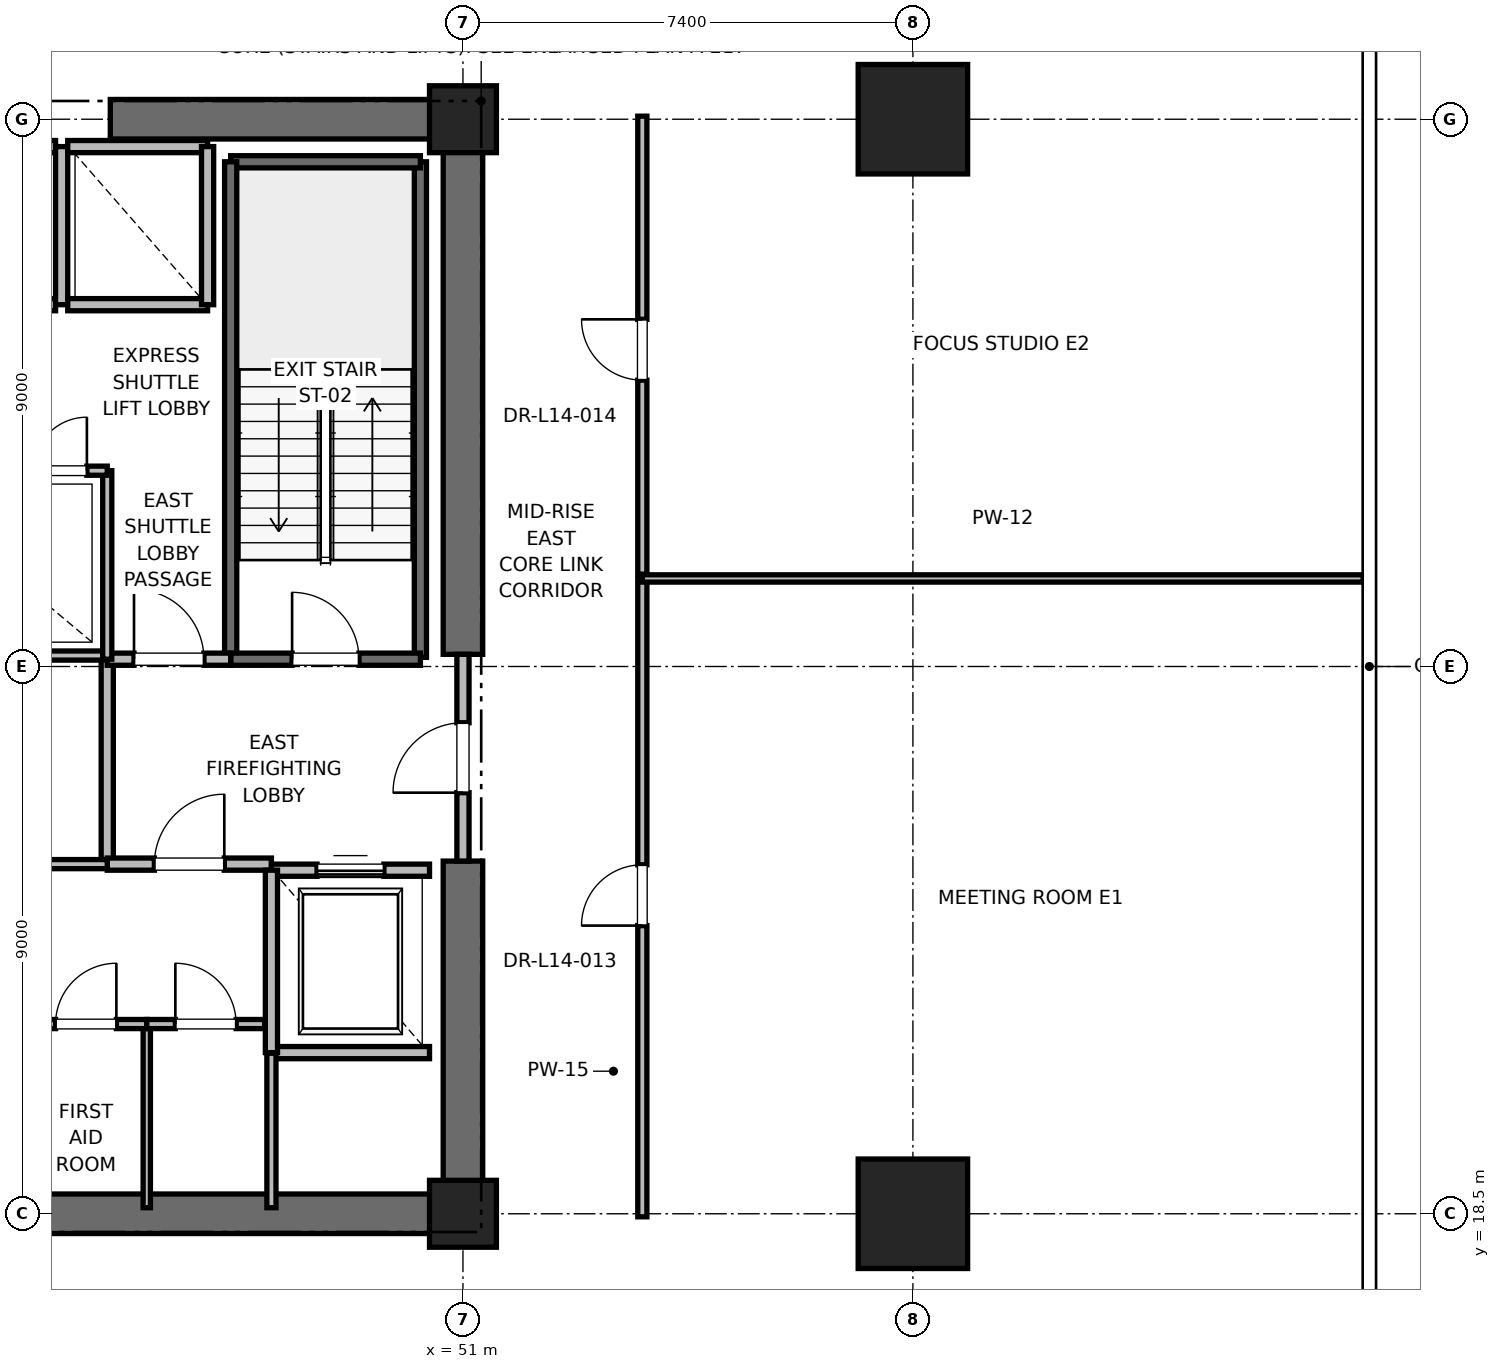
"""IFC4 building model, lengths in metres.
Left out: names, types, materials, properties, quantities, classifications, styles, units other than length and angle.
Written with IfcOpenShell. Run it as: python <this file> out.ifc"""

import sys

from ifc_helpers import new_model, si_unit, direction, frame, frame_2d, origin, origin_2d, place, context, subcontext, project, spatial, rectangle, extrude, element, fill, save


model = new_model("IFC4")
c1 = context("Model", 3, precision=1e-05, world=origin(), true_north=direction((0.0, 1.0)))
c2 = subcontext(c1, "Body", "Model", "MODEL_VIEW")
j1 = project(units=[si_unit("LENGTHUNIT", "METRE"), si_unit("PLANEANGLEUNIT", "RADIAN")], contexts=[c1])
p1 = place(None, origin())
s1 = spatial("IfcSite", under=j1, at=p1, CompositionType="ELEMENT")
p2 = place(p1, origin())
s2 = spatial("IfcBuilding", under=s1, at=p2, CompositionType="ELEMENT")
p3 = place(p2, frame((0.0, 0.0, 63.6)))
s3 = spatial("IfcBuildingStorey", under=s2, at=p3, CompositionType="ELEMENT", Elevation=63.6)
for number, where, z_axis, x_axis in (
    (1, (58.4, 18.5, 0.0), (0.0, 0.0, 1.0), (1.0, 0.0, 0.0)),
    (2, (58.4, 36.5, 0.0), (0.0, 0.0, 1.0), (1.0, 0.0, 0.0)),
):
    element("IfcColumn", number, at=place(p3, frame(where, z_axis=z_axis, x_axis=x_axis)), inside=s3, PredefinedType="COLUMN", context=c2, shape_type="SweptSolid", body=[
        extrude(rectangle(XDim=1.8, YDim=1.8, at=origin_2d()), origin(), (0.0, 0.0, 1.0), 4.0),
    ])
for number, where, z_axis, x_axis in (
    (3, (51.0, 18.5, 0.0), (0.0, 0.0, 1.0), (1.0, 0.0, 0.0)),
    (4, (51.0, 36.5, 0.0), (0.0, 0.0, 1.0), (1.0, 0.0, 0.0)),
):
    element("IfcColumn", number, at=place(p3, frame(where, z_axis=z_axis, x_axis=x_axis)), inside=s3, PredefinedType="PILASTER", context=c2, shape_type="SweptSolid", body=[
        extrude(rectangle(XDim=1.1, YDim=1.1, at=origin_2d()), origin(), (0.0, 0.0, 1.0), 4.0),
    ])
p4 = place(p3, frame((41.8, 18.5, 0.0), z_axis=(0.0, 0.0, 1.0), x_axis=(1.0, 0.0, 0.0)))
e5 = element("IfcWall", 5, at=p4, inside=s3, PredefinedType="SHEAR", context=c2, shape_type="SweptSolid", body=[
    extrude(rectangle(XDim=9.2, YDim=0.65, at=frame_2d((4.6, 0.0))), origin(), (0.0, 0.0, 1.0), 3.76),
])
for number, where, z_axis, x_axis in (
    (6, (45.2, 36.5, 0.0), (0.0, 0.0, 1.0), (1.0, 0.0, 0.0)),
    (7, (51.0, 18.5, 0.0), (0.0, 0.0, 1.0), (0.0, 1.0, 0.0)),
):
    element("IfcWall", number, at=place(p3, frame(where, z_axis=z_axis, x_axis=x_axis)), inside=s3, PredefinedType="SHEAR", context=c2, shape_type="SweptSolid", body=[
        extrude(rectangle(XDim=5.8, YDim=0.65, at=frame_2d((2.9, 0.0))), origin(), (0.0, 0.0, 1.0), 3.76),
    ])
p5 = place(p3, frame((51.0, 27.7, 0.0), z_axis=(0.0, 0.0, 1.0), x_axis=(0.0, 1.0, 0.0)))
e8 = element("IfcWall", 8, at=p5, inside=s3, PredefinedType="SHEAR", context=c2, shape_type="SweptSolid", body=[
    extrude(rectangle(XDim=8.8, YDim=0.65, at=frame_2d((4.4, 0.0))), origin(), (0.0, 0.0, 1.0), 3.76),
])
p6 = place(p3, frame((50.3, 27.65, 0.0), z_axis=(0.0, 0.0, 1.0), x_axis=(0.0, 1.0, 0.0)))
e9 = element("IfcWall", 9, at=p6, inside=s3, PredefinedType="SOLIDWALL", context=c2, shape_type="SweptSolid", body=[
    extrude(rectangle(XDim=8.15, YDim=0.2, at=frame_2d((4.075, 0.0))), origin(), (0.0, 0.0, 1.0), 3.76),
])
p7 = place(p3, frame((47.18, 35.8, 0.0), z_axis=(0.0, 0.0, 1.0), x_axis=(1.0, 0.0, 0.0)))
e10 = element("IfcWall", 10, at=p7, inside=s3, PredefinedType="SOLIDWALL", context=c2, shape_type="SweptSolid", body=[
    extrude(rectangle(XDim=3.12, YDim=0.2, at=frame_2d((1.56, 0.0))), origin(), (0.0, 0.0, 1.0), 3.76),
])
p8 = place(p3, frame((47.18, 27.62, 0.0), z_axis=(0.0, 0.0, 1.0), x_axis=(0.0, 1.0, 0.0)))
e11 = element("IfcWall", 11, at=p8, inside=s3, PredefinedType="SOLIDWALL", context=c2, shape_type="SweptSolid", body=[
    extrude(rectangle(XDim=8.18, YDim=0.2, at=frame_2d((4.09, 0.0))), origin(), (0.0, 0.0, 1.0), 3.76),
])
p9 = place(p3, frame((47.18, 27.62, 0.0), z_axis=(0.0, 0.0, 1.0), x_axis=(1.0, 0.0, 0.0)))
e12 = element("IfcWall", 12, at=p9, inside=s3, PredefinedType="SOLIDWALL", context=c2, shape_type="SweptSolid", body=[
    extrude(rectangle(XDim=3.12, YDim=0.2, at=frame_2d((1.56, 0.0))), origin(), (0.0, 0.0, 1.0), 3.76),
])
p10 = place(p9, frame((1.01, 0.0, 0.0)))
e13 = element("IfcOpeningElement", 13, at=p10, cuts=e12, PredefinedType="OPENING", context=c2, shape_type="SweptSolid", body=[
    extrude(rectangle(XDim=1.1, YDim=2.15, at=frame_2d((0.55, 1.075))), frame((0.0, 0.1, 0.0), z_axis=(0.0, -1.0, 0.0), x_axis=(1.0, 0.0, 0.0)), (0.0, 0.0, 1.0), 0.2),
])
p11 = place(p3, frame((45.15, 24.25, 0.0), z_axis=(0.0, 0.0, 1.0), x_axis=(0.0, 1.0, 0.0)))
e14 = element("IfcWall", 14, at=p11, inside=s3, PredefinedType="PARTITIONING", context=c2, shape_type="SweptSolid", body=[
    extrude(rectangle(XDim=3.37, YDim=0.2, at=frame_2d((1.685, 0.0))), origin(), (0.0, 0.0, 1.0), 3.76),
])
p12 = place(p3, frame((45.15, 24.25, 0.0), z_axis=(0.0, 0.0, 1.0), x_axis=(1.0, 0.0, 0.0)))
e15 = element("IfcWall", 15, at=p12, inside=s3, PredefinedType="PARTITIONING", context=c2, shape_type="SweptSolid", body=[
    extrude(rectangle(XDim=2.7, YDim=0.2, at=frame_2d((1.35, 0.0))), origin(), (0.0, 0.0, 1.0), 3.76),
])
p13 = place(p12, frame((0.775, 0.0, 0.0)))
e16 = element("IfcOpeningElement", 16, at=p13, cuts=e15, PredefinedType="OPENING", context=c2, shape_type="SweptSolid", body=[
    extrude(rectangle(XDim=1.15, YDim=2.2, at=frame_2d((0.575, 1.1))), frame((0.0, 0.1, 0.0), z_axis=(0.0, -1.0, 0.0), x_axis=(1.0, 0.0, 0.0)), (0.0, 0.0, 1.0), 0.2),
])
p14 = place(p3, frame((45.15, 27.62, 0.0), z_axis=(0.0, 0.0, 1.0), x_axis=(1.0, 0.0, 0.0)))
e17 = element("IfcWall", 17, at=p14, inside=s3, PredefinedType="PARTITIONING", context=c2, shape_type="SweptSolid", body=[
    extrude(rectangle(XDim=2.03, YDim=0.2, at=frame_2d((1.015, 0.0))), origin(), (0.0, 0.0, 1.0), 3.76),
])
p15 = place(p14, frame((0.44, 0.0, 0.0)))
e18 = element("IfcOpeningElement", 18, at=p15, cuts=e17, PredefinedType="OPENING", context=c2, shape_type="SweptSolid", body=[
    extrude(rectangle(XDim=1.15, YDim=2.2, at=frame_2d((0.575, 1.1))), frame((0.0, 0.1, 0.0), z_axis=(0.0, -1.0, 0.0), x_axis=(1.0, 0.0, 0.0)), (0.0, 0.0, 1.0), 0.2),
])
p16 = place(p3, frame((51.0, 24.3, 0.0), z_axis=(0.0, 0.0, 1.0), x_axis=(0.0, 1.0, 0.0)))
e19 = element("IfcWall", 19, at=p16, inside=s3, PredefinedType="PARTITIONING", context=c2, shape_type="SweptSolid", body=[
    extrude(rectangle(XDim=3.4, YDim=0.2, at=frame_2d((1.7, 0.0))), origin(), (0.0, 0.0, 1.0), 2.54),
])
p17 = place(p16, frame((1.125, 0.0, 0.0)))
e20 = element("IfcOpeningElement", 20, at=p17, cuts=e19, PredefinedType="OPENING", context=c2, shape_type="SweptSolid", body=[
    extrude(rectangle(XDim=1.15, YDim=2.2, at=frame_2d((0.575, 1.1))), frame((0.0, 0.1, 0.0), z_axis=(0.0, -1.0, 0.0), x_axis=(1.0, 0.0, 0.0)), (0.0, 0.0, 1.0), 0.2),
])
p18 = place(p3, frame((47.85, 21.15, 0.0), z_axis=(0.0, 0.0, 1.0), x_axis=(1.0, 0.0, 0.0)))
e21 = element("IfcWall", 21, at=p18, inside=s3, PredefinedType="SOLIDWALL", context=c2, shape_type="SweptSolid", body=[
    extrude(rectangle(XDim=2.6, YDim=0.2, at=frame_2d((1.3, 0.0))), origin(), (0.0, 0.0, 1.0), 3.76),
])
p19 = place(p3, frame((50.45, 24.15, 0.0), z_axis=(0.0, 0.0, 1.0), x_axis=(-1.0, 0.0, 0.0)))
e22 = element("IfcWall", 22, at=p19, inside=s3, PredefinedType="SOLIDWALL", context=c2, shape_type="SweptSolid", body=[
    extrude(rectangle(XDim=2.6, YDim=0.2, at=frame_2d((1.3, 0.0))), origin(), (0.0, 0.0, 1.0), 2.54),
])
p20 = place(p19, frame((0.75, 0.0, 0.0)))
e23 = element("IfcOpeningElement", 23, at=p20, cuts=e22, PredefinedType="OPENING", context=c2, shape_type="SweptSolid", body=[
    extrude(rectangle(XDim=1.1, YDim=2.2, at=frame_2d((0.55, 1.1))), frame((0.0, 0.1, 0.0), z_axis=(0.0, -1.0, 0.0), x_axis=(1.0, 0.0, 0.0)), (0.0, 0.0, 1.0), 0.2),
])
p21 = place(p3, frame((47.85, 24.15, 0.0), z_axis=(0.0, 0.0, 1.0), x_axis=(0.0, -1.0, 0.0)))
e24 = element("IfcWall", 24, at=p21, inside=s3, PredefinedType="SOLIDWALL", context=c2, shape_type="SweptSolid", body=[
    extrude(rectangle(XDim=3.0, YDim=0.2, at=frame_2d((1.5, 0.0))), origin(), (0.0, 0.0, 1.0), 3.76),
])
p22 = place(p3, frame((42.0, 33.45, 0.0), z_axis=(0.0, 0.0, 1.0), x_axis=(1.0, 0.0, 0.0)))
e25 = element("IfcWall", 25, at=p22, inside=s3, PredefinedType="SOLIDWALL", context=c2, shape_type="SweptSolid", body=[
    extrude(rectangle(XDim=2.3, YDim=0.2, at=frame_2d((1.15, 0.0))), origin(), (0.0, 0.0, 1.0), 3.76),
])
p23 = place(p3, frame((44.3, 36.05, 0.0), z_axis=(0.0, 0.0, 1.0), x_axis=(-1.0, 0.0, 0.0)))
e26 = element("IfcWall", 26, at=p23, inside=s3, PredefinedType="SOLIDWALL", context=c2, shape_type="SweptSolid", body=[
    extrude(rectangle(XDim=2.3, YDim=0.2, at=frame_2d((1.15, 0.0))), origin(), (0.0, 0.0, 1.0), 2.54),
])
p24 = place(p3, frame((44.4, 33.45, 0.0), z_axis=(0.0, 0.0, 1.0), x_axis=(0.0, 1.0, 0.0)))
e27 = element("IfcWall", 27, at=p24, inside=s3, PredefinedType="SOLIDWALL", context=c2, shape_type="SweptSolid", body=[
    extrude(rectangle(XDim=2.6, YDim=0.2, at=frame_2d((1.3, 0.0))), origin(), (0.0, 0.0, 1.0), 2.54),
])
p25 = place(p3, frame((44.5, 33.45, 0.0), z_axis=(0.0, 0.0, 1.0), x_axis=(1.0, 0.0, 0.0)))
e28 = element("IfcWall", 28, at=p25, inside=s3, PredefinedType="SOLIDWALL", context=c2, shape_type="SweptSolid", body=[
    extrude(rectangle(XDim=2.3, YDim=0.2, at=frame_2d((1.15, 0.0))), origin(), (0.0, 0.0, 1.0), 3.76),
])
p26 = place(p3, frame((46.8, 36.05, 0.0), z_axis=(0.0, 0.0, 1.0), x_axis=(-1.0, 0.0, 0.0)))
e29 = element("IfcWall", 29, at=p26, inside=s3, PredefinedType="SOLIDWALL", context=c2, shape_type="SweptSolid", body=[
    extrude(rectangle(XDim=2.3, YDim=0.2, at=frame_2d((1.15, 0.0))), origin(), (0.0, 0.0, 1.0), 2.54),
])
p27 = place(p3, frame((46.8, 33.45, 0.0), z_axis=(0.0, 0.0, 1.0), x_axis=(0.0, 1.0, 0.0)))
e30 = element("IfcWall", 30, at=p27, inside=s3, PredefinedType="SOLIDWALL", context=c2, shape_type="SweptSolid", body=[
    extrude(rectangle(XDim=2.6, YDim=0.2, at=frame_2d((1.3, 0.0))), origin(), (0.0, 0.0, 1.0), 3.76),
])
p28 = place(p3, frame((41.56, 27.68, 0.0), z_axis=(0.0, 0.0, 1.0), x_axis=(1.0, 0.0, 0.0)))
e31 = element("IfcWall", 31, at=p28, inside=s3, PredefinedType="PARTITIONING", context=c2, shape_type="SweptSolid", body=[
    extrude(rectangle(XDim=3.59, YDim=0.15, at=frame_2d((1.795, 0.0))), origin(), (0.0, 0.0, 1.0), 2.85),
])
p29 = place(p3, frame((47.85, 18.6, 0.0), z_axis=(0.0, 0.0, 1.0), x_axis=(0.0, 1.0, 0.0)))
e32 = element("IfcWall", 32, at=p29, inside=s3, PredefinedType="PARTITIONING", context=c2, shape_type="SweptSolid", body=[
    extrude(rectangle(XDim=2.54, YDim=0.15, at=frame_2d((1.27, 0.0))), origin(), (0.0, 0.0, 1.0), 2.85),
])
p30 = place(p3, frame((45.8, 18.6, 0.0), z_axis=(0.0, 0.0, 1.0), x_axis=(0.0, 1.0, 0.0)))
e33 = element("IfcWall", 33, at=p30, inside=s3, PredefinedType="PARTITIONING", context=c2, shape_type="SweptSolid", body=[
    extrude(rectangle(XDim=3.02, YDim=0.12, at=frame_2d((1.51, 0.0))), origin(), (0.0, 0.0, 1.0), 2.85),
])
p31 = place(p3, frame((43.8, 21.62, 0.0), z_axis=(0.0, 0.0, 1.0), x_axis=(1.0, 0.0, 0.0)))
e34 = element("IfcWall", 34, at=p31, inside=s3, PredefinedType="PARTITIONING", context=c2, shape_type="SweptSolid", body=[
    extrude(rectangle(XDim=2.0, YDim=0.15, at=frame_2d((1.0, 0.0))), origin(), (0.0, 0.0, 1.0), 2.85),
])
p32 = place(p31, frame((0.5, 0.0, 0.0)))
e35 = element("IfcOpeningElement", 35, at=p32, cuts=e34, PredefinedType="OPENING", context=c2, shape_type="SweptSolid", body=[
    extrude(rectangle(XDim=1.0, YDim=2.15, at=frame_2d((0.5, 1.075))), frame((0.0, 0.075, 0.0), z_axis=(0.0, -1.0, 0.0), x_axis=(1.0, 0.0, 0.0)), (0.0, 0.0, 1.0), 0.15),
])
p33 = place(p3, frame((45.8, 21.62, 0.0), z_axis=(0.0, 0.0, 1.0), x_axis=(1.0, 0.0, 0.0)))
e36 = element("IfcWall", 36, at=p33, inside=s3, PredefinedType="PARTITIONING", context=c2, shape_type="SweptSolid", body=[
    extrude(rectangle(XDim=1.94, YDim=0.15, at=frame_2d((0.97, 0.0))), origin(), (0.0, 0.0, 1.0), 2.85),
])
p34 = place(p33, frame((0.47, 0.0, 0.0)))
e37 = element("IfcOpeningElement", 37, at=p34, cuts=e36, PredefinedType="OPENING", context=c2, shape_type="SweptSolid", body=[
    extrude(rectangle(XDim=1.0, YDim=2.15, at=frame_2d((0.5, 1.075))), frame((0.0, 0.075, 0.0), z_axis=(0.0, -1.0, 0.0), x_axis=(1.0, 0.0, 0.0)), (0.0, 0.0, 1.0), 0.15),
])
p35 = place(p3, frame((41.76, 24.25, 0.0), z_axis=(0.0, 0.0, 1.0), x_axis=(1.0, 0.0, 0.0)))
e38 = element("IfcWall", 38, at=p35, inside=s3, PredefinedType="PARTITIONING", context=c2, shape_type="SweptSolid", body=[
    extrude(rectangle(XDim=3.39, YDim=0.15, at=frame_2d((1.695, 0.0))), origin(), (0.0, 0.0, 1.0), 2.85),
])
p36 = place(p35, frame((1.255, 0.0, 0.0)))
e39 = element("IfcOpeningElement", 39, at=p36, cuts=e38, PredefinedType="OPENING", context=c2, shape_type="SweptSolid", body=[
    extrude(rectangle(XDim=0.88, YDim=2.1, at=frame_2d((0.44, 1.05))), frame((0.0, 0.075, 0.0), z_axis=(0.0, -1.0, 0.0), x_axis=(1.0, 0.0, 0.0)), (0.0, 0.0, 1.0), 0.15),
])
p37 = place(p3, frame((45.15, 27.62, 0.0), z_axis=(0.0, 0.0, 1.0), x_axis=(0.0, 1.0, 0.0)))
e40 = element("IfcWall", 40, at=p37, inside=s3, PredefinedType="PARTITIONING", context=c2, shape_type="SweptSolid", body=[
    extrude(rectangle(XDim=3.1, YDim=0.15, at=frame_2d((1.55, 0.0))), origin(), (0.0, 0.0, 1.0), 2.85),
])
p38 = place(p3, frame((43.6, 30.72, 0.0), z_axis=(0.0, 0.0, 1.0), x_axis=(1.0, 0.0, 0.0)))
e41 = element("IfcWall", 41, at=p38, inside=s3, PredefinedType="PARTITIONING", context=c2, shape_type="SweptSolid", body=[
    extrude(rectangle(XDim=1.55, YDim=0.15, at=frame_2d((0.775, 0.0))), origin(), (0.0, 0.0, 1.0), 2.85),
])
p39 = place(p38, frame((0.335, 0.0, 0.0)))
e42 = element("IfcOpeningElement", 42, at=p39, cuts=e41, PredefinedType="OPENING", context=c2, shape_type="SweptSolid", body=[
    extrude(rectangle(XDim=0.88, YDim=2.1, at=frame_2d((0.44, 1.05))), frame((0.0, 0.075, 0.0), z_axis=(0.0, -1.0, 0.0), x_axis=(1.0, 0.0, 0.0)), (0.0, 0.0, 1.0), 0.15),
])
p40 = place(p3, frame((53.95, 18.45, 0.0), z_axis=(0.0, 0.0, 1.0), x_axis=(0.0, 1.0, 0.0)))
e43 = element("IfcWall", 43, at=p40, inside=s3, PredefinedType="PARTITIONING", context=c2, shape_type="SweptSolid", body=[
    extrude(rectangle(XDim=10.498, YDim=0.15, at=frame_2d((5.249, 0.0))), origin(), (0.0, 0.0, 1.0), 2.85),
])
p41 = place(p40, frame((4.789, 0.0, 0.0)))
e44 = element("IfcOpeningElement", 44, at=p41, cuts=e43, PredefinedType="OPENING", context=c2, shape_type="SweptSolid", body=[
    extrude(rectangle(XDim=1.0, YDim=2.15, at=frame_2d((0.5, 1.075))), frame((0.0, 0.075, 0.0), z_axis=(0.0, -1.0, 0.0), x_axis=(1.0, 0.0, 0.0)), (0.0, 0.0, 1.0), 0.15),
])
p42 = place(p3, frame((53.95, 28.948, 0.0), z_axis=(0.0, 0.0, 1.0), x_axis=(1.0, 0.0, 0.0)))
e45 = element("IfcWall", 45, at=p42, inside=s3, PredefinedType="PARTITIONING", context=c2, shape_type="SweptSolid", body=[
    extrude(rectangle(XDim=11.857, YDim=0.12, at=frame_2d((5.929, 0.0))), origin(), (0.0, 0.0, 1.0), 2.85),
])
p43 = place(p3, frame((53.95, 29.018, 0.0), z_axis=(0.0, 0.0, 1.0), x_axis=(0.0, 1.0, 0.0)))
e46 = element("IfcWall", 46, at=p43, inside=s3, PredefinedType="PARTITIONING", context=c2, shape_type="SweptSolid", body=[
    extrude(rectangle(XDim=7.532, YDim=0.15, at=frame_2d((3.766, 0.0))), origin(), (0.0, 0.0, 1.0), 2.85),
])
p44 = place(p43, frame((3.191, 0.0, 0.0)))
e47 = element("IfcOpeningElement", 47, at=p44, cuts=e46, PredefinedType="OPENING", context=c2, shape_type="SweptSolid", body=[
    extrude(rectangle(XDim=1.0, YDim=2.15, at=frame_2d((0.5, 1.075))), frame((0.0, 0.075, 0.0), z_axis=(0.0, -1.0, 0.0), x_axis=(1.0, 0.0, 0.0)), (0.0, 0.0, 1.0), 0.15),
])
p45 = place(p10, origin())
e48 = element("IfcDoor", 48, at=p45, inside=s3, OperationType="SINGLE_SWING_LEFT", PredefinedType="DOOR", context=c2, shape_type="SweptSolid", body=[
    extrude(rectangle(XDim=1.1, YDim=2.15, at=frame_2d((0.55, 1.075))), frame((0.0, 0.025, 0.0), z_axis=(0.0, -1.0, 0.0), x_axis=(1.0, 0.0, 0.0)), (0.0, 0.0, 1.0), 0.05),
])
fill(e13, e48)
p46 = place(p13, origin())
e49 = element("IfcDoor", 49, at=p46, inside=s3, OperationType="SINGLE_SWING_RIGHT", PredefinedType="DOOR", context=c2, shape_type="SweptSolid", body=[
    extrude(rectangle(XDim=1.15, YDim=2.2, at=frame_2d((0.575, 1.1))), frame((0.0, 0.025, 0.0), z_axis=(0.0, -1.0, 0.0), x_axis=(1.0, 0.0, 0.0)), (0.0, 0.0, 1.0), 0.05),
])
fill(e16, e49)
p47 = place(p15, origin())
e50 = element("IfcDoor", 50, at=p47, inside=s3, OperationType="SINGLE_SWING_LEFT", PredefinedType="DOOR", context=c2, shape_type="SweptSolid", body=[
    extrude(rectangle(XDim=1.15, YDim=2.2, at=frame_2d((0.575, 1.1))), frame((0.0, 0.025, 0.0), z_axis=(0.0, -1.0, 0.0), x_axis=(1.0, 0.0, 0.0)), (0.0, 0.0, 1.0), 0.05),
])
fill(e18, e50)
p48 = place(p17, origin())
e51 = element("IfcDoor", 51, at=p48, inside=s3, OperationType="SINGLE_SWING_LEFT", PredefinedType="DOOR", context=c2, shape_type="SweptSolid", body=[
    extrude(rectangle(XDim=1.15, YDim=2.2, at=frame_2d((0.575, 1.1))), frame((0.0, 0.025, 0.0), z_axis=(0.0, -1.0, 0.0), x_axis=(1.0, 0.0, 0.0)), (0.0, 0.0, 1.0), 0.05),
])
fill(e20, e51)
p49 = place(p20, origin())
e52 = element("IfcDoor", 52, at=p49, inside=s3, OperationType="SLIDING_TO_RIGHT", PredefinedType="DOOR", context=c2, shape_type="SweptSolid", body=[
    extrude(rectangle(XDim=1.1, YDim=2.2, at=frame_2d((0.55, 1.1))), frame((0.0, 0.025, 0.0), z_axis=(0.0, -1.0, 0.0), x_axis=(1.0, 0.0, 0.0)), (0.0, 0.0, 1.0), 0.05),
])
fill(e23, e52)
p50 = place(p32, origin())
e53 = element("IfcDoor", 53, at=p50, inside=s3, OperationType="SINGLE_SWING_RIGHT", PredefinedType="DOOR", context=c2, shape_type="SweptSolid", body=[
    extrude(rectangle(XDim=1.0, YDim=2.15, at=frame_2d((0.5, 1.075))), frame((0.0, 0.025, 0.0), z_axis=(0.0, -1.0, 0.0), x_axis=(1.0, 0.0, 0.0)), (0.0, 0.0, 1.0), 0.05),
])
fill(e35, e53)
p51 = place(p34, origin())
e54 = element("IfcDoor", 54, at=p51, inside=s3, OperationType="SINGLE_SWING_LEFT", PredefinedType="DOOR", context=c2, shape_type="SweptSolid", body=[
    extrude(rectangle(XDim=1.0, YDim=2.15, at=frame_2d((0.5, 1.075))), frame((0.0, 0.025, 0.0), z_axis=(0.0, -1.0, 0.0), x_axis=(1.0, 0.0, 0.0)), (0.0, 0.0, 1.0), 0.05),
])
fill(e37, e54)
p52 = place(p39, origin())
e55 = element("IfcDoor", 55, at=p52, inside=s3, OperationType="SINGLE_SWING_RIGHT", PredefinedType="DOOR", context=c2, shape_type="SweptSolid", body=[
    extrude(rectangle(XDim=0.88, YDim=2.1, at=frame_2d((0.44, 1.05))), frame((0.0, 0.025, 0.0), z_axis=(0.0, -1.0, 0.0), x_axis=(1.0, 0.0, 0.0)), (0.0, 0.0, 1.0), 0.05),
])
fill(e42, e55)
p53 = place(p41, origin())
e56 = element("IfcDoor", 56, at=p53, inside=s3, OperationType="SINGLE_SWING_LEFT", PredefinedType="DOOR", context=c2, shape_type="SweptSolid", body=[
    extrude(rectangle(XDim=1.0, YDim=2.15, at=frame_2d((0.5, 1.075))), frame((0.0, 0.025, 0.0), z_axis=(0.0, -1.0, 0.0), x_axis=(1.0, 0.0, 0.0)), (0.0, 0.0, 1.0), 0.05),
])
fill(e44, e56)
p54 = place(p44, origin())
e57 = element("IfcDoor", 57, at=p54, inside=s3, OperationType="SINGLE_SWING_RIGHT", PredefinedType="DOOR", context=c2, shape_type="SweptSolid", body=[
    extrude(rectangle(XDim=1.0, YDim=2.15, at=frame_2d((0.5, 1.075))), frame((0.0, 0.025, 0.0), z_axis=(0.0, -1.0, 0.0), x_axis=(1.0, 0.0, 0.0)), (0.0, 0.0, 1.0), 0.05),
])
fill(e47, e57)
save(model, sys.argv[1])
